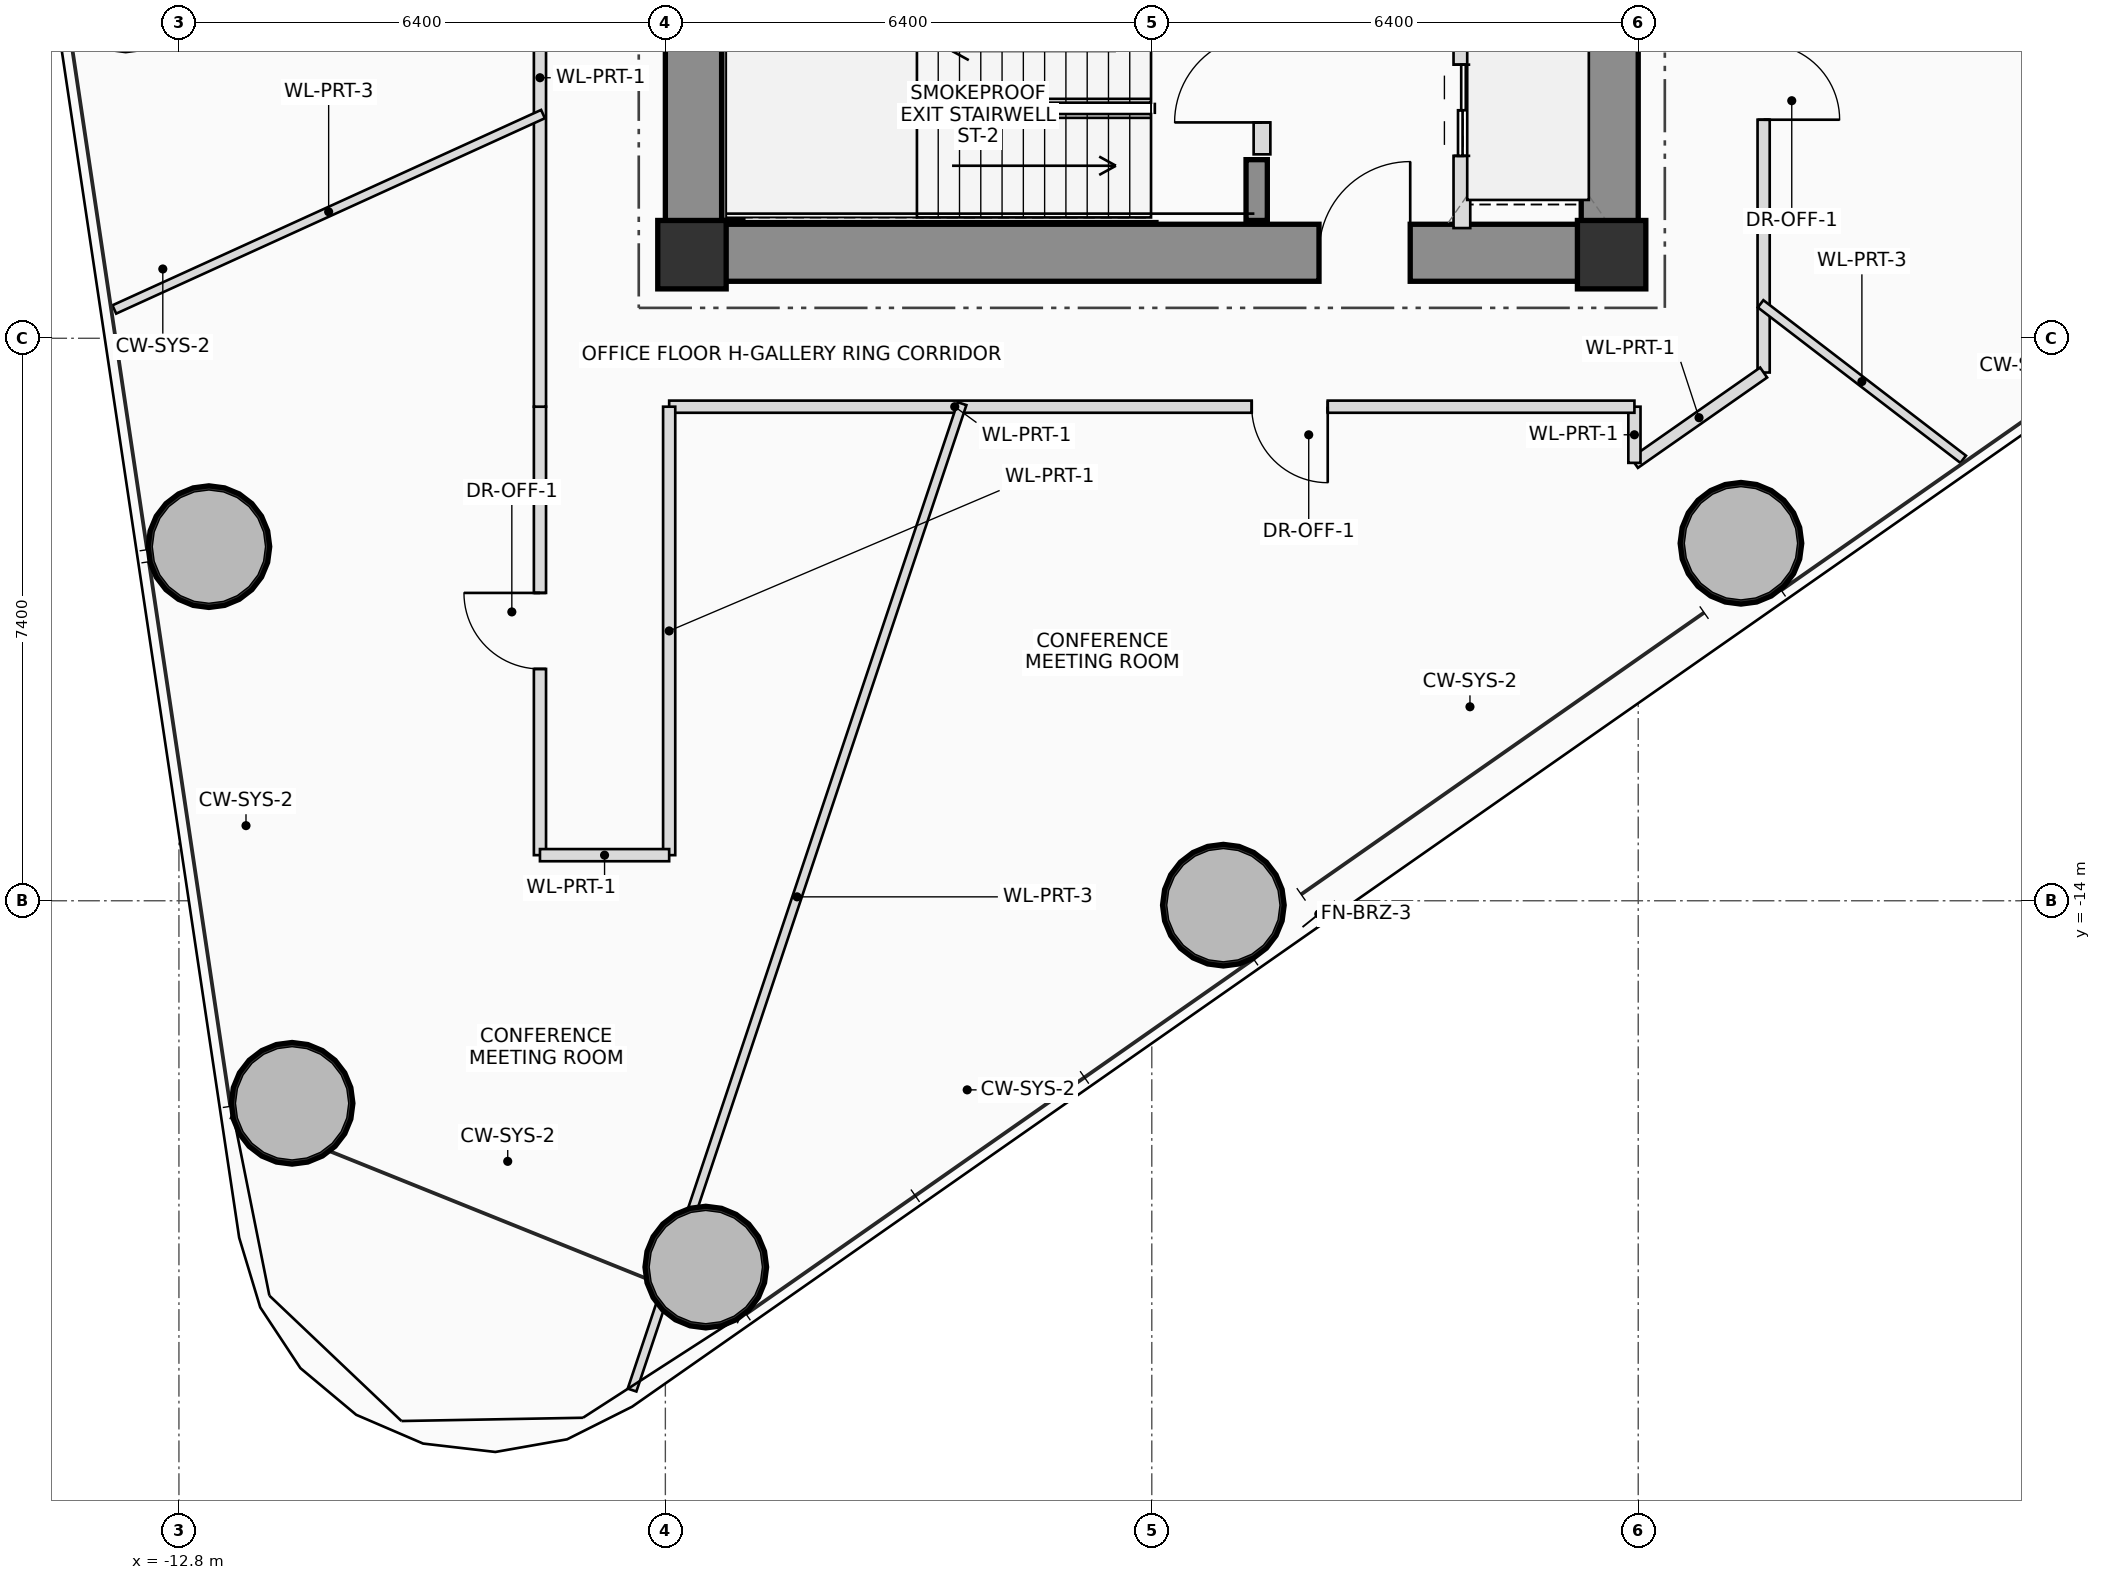
"""IFC4 building model, lengths in metres.
Left out: names, types, materials, properties, quantities, classifications, styles, units other than length and angle.
Written with IfcOpenShell. Run it as: python <this file> out.ifc"""

import sys

from ifc_helpers import new_model, si_unit, direction, frame, frame_2d, origin, origin_2d, place, context, subcontext, project, spatial, rectangle, hollow_circle, extrude, source, transform, mapped, element, fill, save


model = new_model("IFC4")
c1 = context("Model", 3, precision=1e-05, world=origin(), true_north=direction((0.0, 1.0)))
c2 = subcontext(c1, "Body", "Model", "MODEL_VIEW")
j1 = project(units=[si_unit("LENGTHUNIT", "METRE"), si_unit("PLANEANGLEUNIT", "RADIAN")], contexts=[c1])
p1 = place(None, origin())
s1 = spatial("IfcSite", under=j1, at=p1, CompositionType="ELEMENT")
p2 = place(p1, origin())
s2 = spatial("IfcBuilding", under=s1, at=p2, CompositionType="ELEMENT")
p3 = place(p2, frame((0.0, 0.0, 58.55)))
s3 = spatial("IfcBuildingStorey", under=s2, at=p3, CompositionType="ELEMENT", Elevation=58.55)
m1 = source(origin(), c2, "Body", "SweptSolid", [
    extrude(rectangle(XDim=0.9, YDim=0.9, at=origin_2d()), origin(), (0.0, 0.0, 1.0), 3.75),
])
for number, where, z_axis, x_axis in (
    (1, (-6.05, -5.5, 0.0), (0.0, 0.0, 1.0), (1.0, 0.0, 0.0)),
    (2, (6.05, -5.5, 0.0), (0.0, 0.0, 1.0), (1.0, 0.0, 0.0)),
):
    element("IfcColumn", number, at=place(p3, frame(where, z_axis=z_axis, x_axis=x_axis)), inside=s3, PredefinedType="COLUMN", context=c2, shape_type="MappedRepresentation", body=[
        mapped(m1, transform((0.0, 0.0, 0.0), scale=1.0)),
    ])
p4 = place(p3, frame((-6.4, -5.475, 0.0), z_axis=(0.0, 0.0, 1.0), x_axis=(1.0, 0.0, 0.0)))
e3 = element("IfcWall", 3, at=p4, inside=s3, PredefinedType="SHEAR", context=c2, shape_type="SweptSolid", body=[
    extrude(rectangle(XDim=12.8, YDim=0.75, at=frame_2d((6.4, 0.0))), origin(), (0.0, 0.0, 1.0), 3.75),
])
p5 = place(p4, frame((8.6, 0.0, 0.0)))
e4 = element("IfcOpeningElement", 4, at=p5, cuts=e3, PredefinedType="OPENING", context=c2, shape_type="SweptSolid", body=[
    extrude(rectangle(XDim=1.2, YDim=2.2, at=frame_2d((0.6, 1.1))), frame((0.0, 0.385, 0.0), z_axis=(0.0, -1.0, 0.0), x_axis=(1.0, 0.0, 0.0)), (0.0, 0.0, 1.0), 0.77),
])
p6 = place(p3, frame((6.025, -5.1, 0.0), z_axis=(0.0, 0.0, 1.0), x_axis=(0.0, 1.0, 0.0)))
e5 = element("IfcWall", 5, at=p6, inside=s3, PredefinedType="SHEAR", context=c2, shape_type="SweptSolid", body=[
    extrude(rectangle(XDim=10.2, YDim=0.75, at=frame_2d((5.1, 0.0))), origin(), (0.0, 0.0, 1.0), 3.75),
])
p7 = place(p3, frame((-6.025, -5.1, 0.0), z_axis=(0.0, 0.0, 1.0), x_axis=(0.0, 1.0, 0.0)))
e6 = element("IfcWall", 6, at=p7, inside=s3, PredefinedType="SHEAR", context=c2, shape_type="SweptSolid", body=[
    extrude(rectangle(XDim=3.35, YDim=0.75, at=frame_2d((1.675, 0.0))), origin(), (0.0, 0.0, 1.0), 3.75),
])
p8 = place(p3, frame((-5.52, -5.05, 0.0), z_axis=(0.0, 0.0, 1.0), x_axis=(0.0, 1.0, 0.0)))
e7 = element("IfcWall", 7, at=p8, inside=s3, PredefinedType="SHEAR", context=c2, shape_type="SweptSolid", body=[
    extrude(rectangle(XDim=2.75, YDim=0.28, at=frame_2d((1.375, 0.0))), origin(), (0.0, 0.0, 1.0), 3.75),
])
p9 = place(p3, frame((1.38, -5.05, 0.0), z_axis=(0.0, 0.0, 1.0), x_axis=(0.0, 1.0, 0.0)))
e8 = element("IfcWall", 8, at=p9, inside=s3, PredefinedType="SHEAR", context=c2, shape_type="SweptSolid", body=[
    extrude(rectangle(XDim=0.8, YDim=0.28, at=frame_2d((0.4, 0.0))), origin(), (0.0, 0.0, 1.0), 3.75),
])
m2 = source(origin(), c2, "Body", "SweptSolid", [
    extrude(hollow_circle(Radius=0.8, WallThickness=0.055, at=origin_2d()), origin(), (0.0, 0.0, 1.0), 3.75),
])
for number, where, z_axis, x_axis in (
    (9, (-5.868, -18.819, 0.0), (0.0, 0.0, 1.0), (1.0, 0.0, 0.0)),
    (10, (0.942, -14.058, 0.0), (0.0, 0.0, 1.0), (1.0, 0.0, 0.0)),
    (11, (7.752, -9.297, 0.0), (0.0, 0.0, 1.0), (1.0, 0.0, 0.0)),
    (12, (-12.406, -9.341, 0.0), (0.0, 0.0, 1.0), (1.0, 0.0, 0.0)),
    (13, (-11.311, -16.665, 0.0), (0.0, 0.0, 1.0), (1.0, 0.0, 0.0)),
):
    element("IfcColumn", number, at=place(p3, frame(where, z_axis=z_axis, x_axis=x_axis)), inside=s3, PredefinedType="COLUMN", context=c2, shape_type="MappedRepresentation", body=[
        mapped(m2, transform((0.0, 0.0, 0.0), scale=1.0)),
    ])
p10 = place(p3, frame((1.45, -4.18, 0.0), z_axis=(0.0, 0.0, 1.0), x_axis=(0.0, 1.0, 0.0)))
e14 = element("IfcWall", 14, at=p10, inside=s3, PredefinedType="PLUMBINGWALL", context=c2, shape_type="SweptSolid", body=[
    extrude(rectangle(XDim=1.98, YDim=0.22, at=frame_2d((0.99, 0.0))), origin(), (0.0, 0.0, 1.0), 3.545),
])
p11 = place(p10, frame((0.42, 0.0, 0.0)))
e15 = element("IfcOpeningElement", 15, at=p11, cuts=e14, PredefinedType="OPENING", context=c2, shape_type="SweptSolid", body=[
    extrude(rectangle(XDim=1.15, YDim=2.15, at=frame_2d((0.575, 1.075))), frame((0.0, 0.12, 0.0), z_axis=(0.0, -1.0, 0.0), x_axis=(1.0, 0.0, 0.0)), (0.0, 0.0, 1.0), 0.24),
])
p12 = place(p3, frame((4.08, -5.15, 0.0), z_axis=(0.0, 0.0, 1.0), x_axis=(0.0, 1.0, 0.0)))
e16 = element("IfcWall", 16, at=p12, inside=s3, PredefinedType="PLUMBINGWALL", context=c2, shape_type="SweptSolid", body=[
    extrude(rectangle(XDim=2.95, YDim=0.22, at=frame_2d((1.475, 0.0))), origin(), (0.0, 0.0, 1.0), 3.545),
])
p13 = place(p12, frame((0.95, 0.0, 0.0)))
e17 = element("IfcOpeningElement", 17, at=p13, cuts=e16, PredefinedType="OPENING", context=c2, shape_type="SweptSolid", body=[
    extrude(rectangle(XDim=1.2, YDim=2.25, at=frame_2d((0.6, 1.125))), frame((0.0, 0.12, 0.0), z_axis=(0.0, -1.0, 0.0), x_axis=(1.0, 0.0, 0.0)), (0.0, 0.0, 1.0), 0.24),
])
p14 = place(p3, frame((-8.05, -13.4, 0.0), z_axis=(0.0, 0.0, 1.0), x_axis=(0.0, 1.0, 0.0)))
e18 = element("IfcWall", 18, at=p14, inside=s3, PredefinedType="PARTITIONING", context=c2, shape_type="SweptSolid", body=[
    extrude(rectangle(XDim=5.9, YDim=0.16, at=frame_2d((2.95, 0.0))), origin(), (0.0, 0.0, 1.0), 2.85),
])
p15 = place(p14, frame((2.45, 0.0, 0.0)))
e19 = element("IfcOpeningElement", 19, at=p15, cuts=e18, PredefinedType="OPENING", context=c2, shape_type="SweptSolid", body=[
    extrude(rectangle(XDim=1.0, YDim=2.25, at=frame_2d((0.5, 1.125))), frame((0.0, 0.09, 0.0), z_axis=(0.0, -1.0, 0.0), x_axis=(1.0, 0.0, 0.0)), (0.0, 0.0, 1.0), 0.18),
])
p16 = place(p3, frame((-8.05, -7.5, 0.0), z_axis=(0.0, 0.0, 1.0), x_axis=(0.0, 1.0, 0.0)))
e20 = element("IfcWall", 20, at=p16, inside=s3, PredefinedType="PARTITIONING", context=c2, shape_type="SweptSolid", body=[
    extrude(rectangle(XDim=15.0, YDim=0.16, at=frame_2d((7.5, 0.0))), origin(), (0.0, 0.0, 1.0), 2.85),
])
p17 = place(p16, frame((8.806, 0.0, 0.0)))
e21 = element("IfcOpeningElement", 21, at=p17, cuts=e20, PredefinedType="OPENING", context=c2, shape_type="SweptSolid", body=[
    extrude(rectangle(XDim=1.0, YDim=2.25, at=frame_2d((0.5, 1.125))), frame((0.0, 0.09, 0.0), z_axis=(0.0, -1.0, 0.0), x_axis=(1.0, 0.0, 0.0)), (0.0, 0.0, 1.0), 0.18),
])
p18 = place(p3, frame((8.05, -0.02, 0.0), z_axis=(0.0, 0.0, 1.0), x_axis=(0.0, -1.0, 0.0)))
e22 = element("IfcWall", 22, at=p18, inside=s3, PredefinedType="PARTITIONING", context=c2, shape_type="SweptSolid", body=[
    extrude(rectangle(XDim=7.03, YDim=0.16, at=frame_2d((3.515, 0.0))), origin(), (0.0, 0.0, 1.0), 2.85),
])
p19 = place(p18, frame((2.705, 0.0, 0.0)))
e23 = element("IfcOpeningElement", 23, at=p19, cuts=e22, PredefinedType="OPENING", context=c2, shape_type="SweptSolid", body=[
    extrude(rectangle(XDim=1.0, YDim=2.25, at=frame_2d((0.5, 1.125))), frame((0.0, 0.09, 0.0), z_axis=(0.0, -1.0, 0.0), x_axis=(1.0, 0.0, 0.0)), (0.0, 0.0, 1.0), 0.18),
])
p20 = place(p3, frame((8.05, -7.05, 0.0), z_axis=(0.0, 0.0, 1.0), x_axis=(-0.819513816746, -0.573059424635, 0.0)))
e24 = element("IfcWall", 24, at=p20, inside=s3, PredefinedType="PARTITIONING", context=c2, shape_type="SweptSolid", body=[
    extrude(rectangle(XDim=2.074, YDim=0.16, at=frame_2d((1.037, 0.0))), origin(), (0.0, 0.0, 1.0), 2.85),
])
p21 = place(p3, frame((6.35, -8.239, 0.0), z_axis=(0.0, 0.0, 1.0), x_axis=(0.0, 1.0, 0.0)))
e25 = element("IfcWall", 25, at=p21, inside=s3, PredefinedType="PARTITIONING", context=c2, shape_type="SweptSolid", body=[
    extrude(rectangle(XDim=0.739, YDim=0.16, at=frame_2d((0.37, 0.0))), origin(), (0.0, 0.0, 1.0), 3.545),
])
p22 = place(p3, frame((6.35, -7.5, 0.0), z_axis=(0.0, 0.0, 1.0), x_axis=(-1.0, 0.0, 0.0)))
e26 = element("IfcWall", 26, at=p22, inside=s3, PredefinedType="PARTITIONING", context=c2, shape_type="SweptSolid", body=[
    extrude(rectangle(XDim=12.7, YDim=0.16, at=frame_2d((6.35, 0.0))), origin(), (0.0, 0.0, 1.0), 2.85),
])
p23 = place(p22, frame((4.035, 0.0, 0.0)))
e27 = element("IfcOpeningElement", 27, at=p23, cuts=e26, PredefinedType="OPENING", context=c2, shape_type="SweptSolid", body=[
    extrude(rectangle(XDim=1.0, YDim=2.25, at=frame_2d((0.5, 1.125))), frame((0.0, 0.09, 0.0), z_axis=(0.0, -1.0, 0.0), x_axis=(1.0, 0.0, 0.0)), (0.0, 0.0, 1.0), 0.18),
])
p24 = place(p3, frame((-6.35, -7.5, 0.0), z_axis=(0.0, 0.0, 1.0), x_axis=(0.0, -1.0, 0.0)))
e28 = element("IfcWall", 28, at=p24, inside=s3, PredefinedType="PARTITIONING", context=c2, shape_type="SweptSolid", body=[
    extrude(rectangle(XDim=5.9, YDim=0.16, at=frame_2d((2.95, 0.0))), origin(), (0.0, 0.0, 1.0), 3.05),
])
p25 = place(p3, frame((-6.35, -13.4, 0.0), z_axis=(0.0, 0.0, 1.0), x_axis=(-1.0, 0.0, 0.0)))
e29 = element("IfcWall", 29, at=p25, inside=s3, PredefinedType="PARTITIONING", context=c2, shape_type="SweptSolid", body=[
    extrude(rectangle(XDim=1.7, YDim=0.16, at=frame_2d((0.85, 0.0))), origin(), (0.0, 0.0, 1.0), 3.545),
])
p26 = place(p3, frame((-8.01, -3.65, 0.0), z_axis=(0.0, 0.0, 1.0), x_axis=(-0.909955974898, -0.414704863425, 0.0)))
e30 = element("IfcWall", 30, at=p26, inside=s3, PredefinedType="PARTITIONING", context=c2, shape_type="SweptSolid", body=[
    extrude(rectangle(XDim=6.198, YDim=0.12, at=frame_2d((3.099, 0.0))), origin(), (0.0, 0.0, 1.0), 2.85),
])
p27 = place(p3, frame((-2.496, -7.46, 0.0), z_axis=(0.0, 0.0, 1.0), x_axis=(-0.317303379034, -0.948324082608, 0.0)))
e31 = element("IfcWall", 31, at=p27, inside=s3, PredefinedType="PARTITIONING", context=c2, shape_type="SweptSolid", body=[
    extrude(rectangle(XDim=13.684, YDim=0.12, at=frame_2d((6.842, 0.0))), origin(), (0.0, 0.0, 1.0), 2.85),
])
p28 = place(p3, frame((8.01, -6.146, 0.0), z_axis=(0.0, 0.0, 1.0), x_axis=(0.79333380799, -0.608786883153, 0.0)))
e32 = element("IfcWall", 32, at=p28, inside=s3, PredefinedType="PARTITIONING", context=c2, shape_type="SweptSolid", body=[
    extrude(rectangle(XDim=3.36, YDim=0.12, at=frame_2d((1.68, 0.0))), origin(), (0.0, 0.0, 1.0), 3.01),
])
p29 = place(p5, origin())
e33 = element("IfcDoor", 33, at=p29, inside=s3, OperationType="SINGLE_SWING_RIGHT", PredefinedType="DOOR", context=c2, shape_type="SweptSolid", body=[
    extrude(rectangle(XDim=1.2, YDim=2.2, at=frame_2d((0.6, 1.1))), frame((0.0, 0.025, 0.0), z_axis=(0.0, -1.0, 0.0), x_axis=(1.0, 0.0, 0.0)), (0.0, 0.0, 1.0), 0.05),
])
fill(e4, e33)
p30 = place(p11, origin())
e34 = element("IfcDoor", 34, at=p30, inside=s3, OperationType="SINGLE_SWING_LEFT", PredefinedType="DOOR", context=c2, shape_type="SweptSolid", body=[
    extrude(rectangle(XDim=1.15, YDim=2.15, at=frame_2d((0.575, 1.075))), frame((0.0, 0.025, 0.0), z_axis=(0.0, -1.0, 0.0), x_axis=(1.0, 0.0, 0.0)), (0.0, 0.0, 1.0), 0.05),
])
fill(e15, e34)
p31 = place(p13, origin())
e35 = element("IfcDoor", 35, at=p31, inside=s3, OperationType="DOUBLE_DOOR_SLIDING", PredefinedType="DOOR", context=c2, shape_type="SweptSolid", body=[
    extrude(rectangle(XDim=1.2, YDim=2.25, at=frame_2d((0.6, 1.125))), frame((0.0, 0.025, 0.0), z_axis=(0.0, -1.0, 0.0), x_axis=(1.0, 0.0, 0.0)), (0.0, 0.0, 1.0), 0.05),
])
fill(e17, e35)
p32 = place(p15, origin())
e36 = element("IfcDoor", 36, at=p32, inside=s3, OperationType="SINGLE_SWING_RIGHT", PredefinedType="DOOR", context=c2, shape_type="SweptSolid", body=[
    extrude(rectangle(XDim=1.0, YDim=2.25, at=frame_2d((0.5, 1.125))), frame((0.0, 0.025, 0.0), z_axis=(0.0, -1.0, 0.0), x_axis=(1.0, 0.0, 0.0)), (0.0, 0.0, 1.0), 0.05),
])
fill(e19, e36)
p33 = place(p19, origin())
e37 = element("IfcDoor", 37, at=p33, inside=s3, OperationType="SINGLE_SWING_RIGHT", PredefinedType="DOOR", context=c2, shape_type="SweptSolid", body=[
    extrude(rectangle(XDim=1.0, YDim=2.25, at=frame_2d((0.5, 1.125))), frame((0.0, 0.025, 0.0), z_axis=(0.0, -1.0, 0.0), x_axis=(1.0, 0.0, 0.0)), (0.0, 0.0, 1.0), 0.05),
])
fill(e23, e37)
p34 = place(p23, origin())
e38 = element("IfcDoor", 38, at=p34, inside=s3, OperationType="SINGLE_SWING_LEFT", PredefinedType="DOOR", context=c2, shape_type="SweptSolid", body=[
    extrude(rectangle(XDim=1.0, YDim=2.25, at=frame_2d((0.5, 1.125))), frame((0.0, 0.025, 0.0), z_axis=(0.0, -1.0, 0.0), x_axis=(1.0, 0.0, 0.0)), (0.0, 0.0, 1.0), 0.05),
])
fill(e27, e38)
save(model, sys.argv[1])
